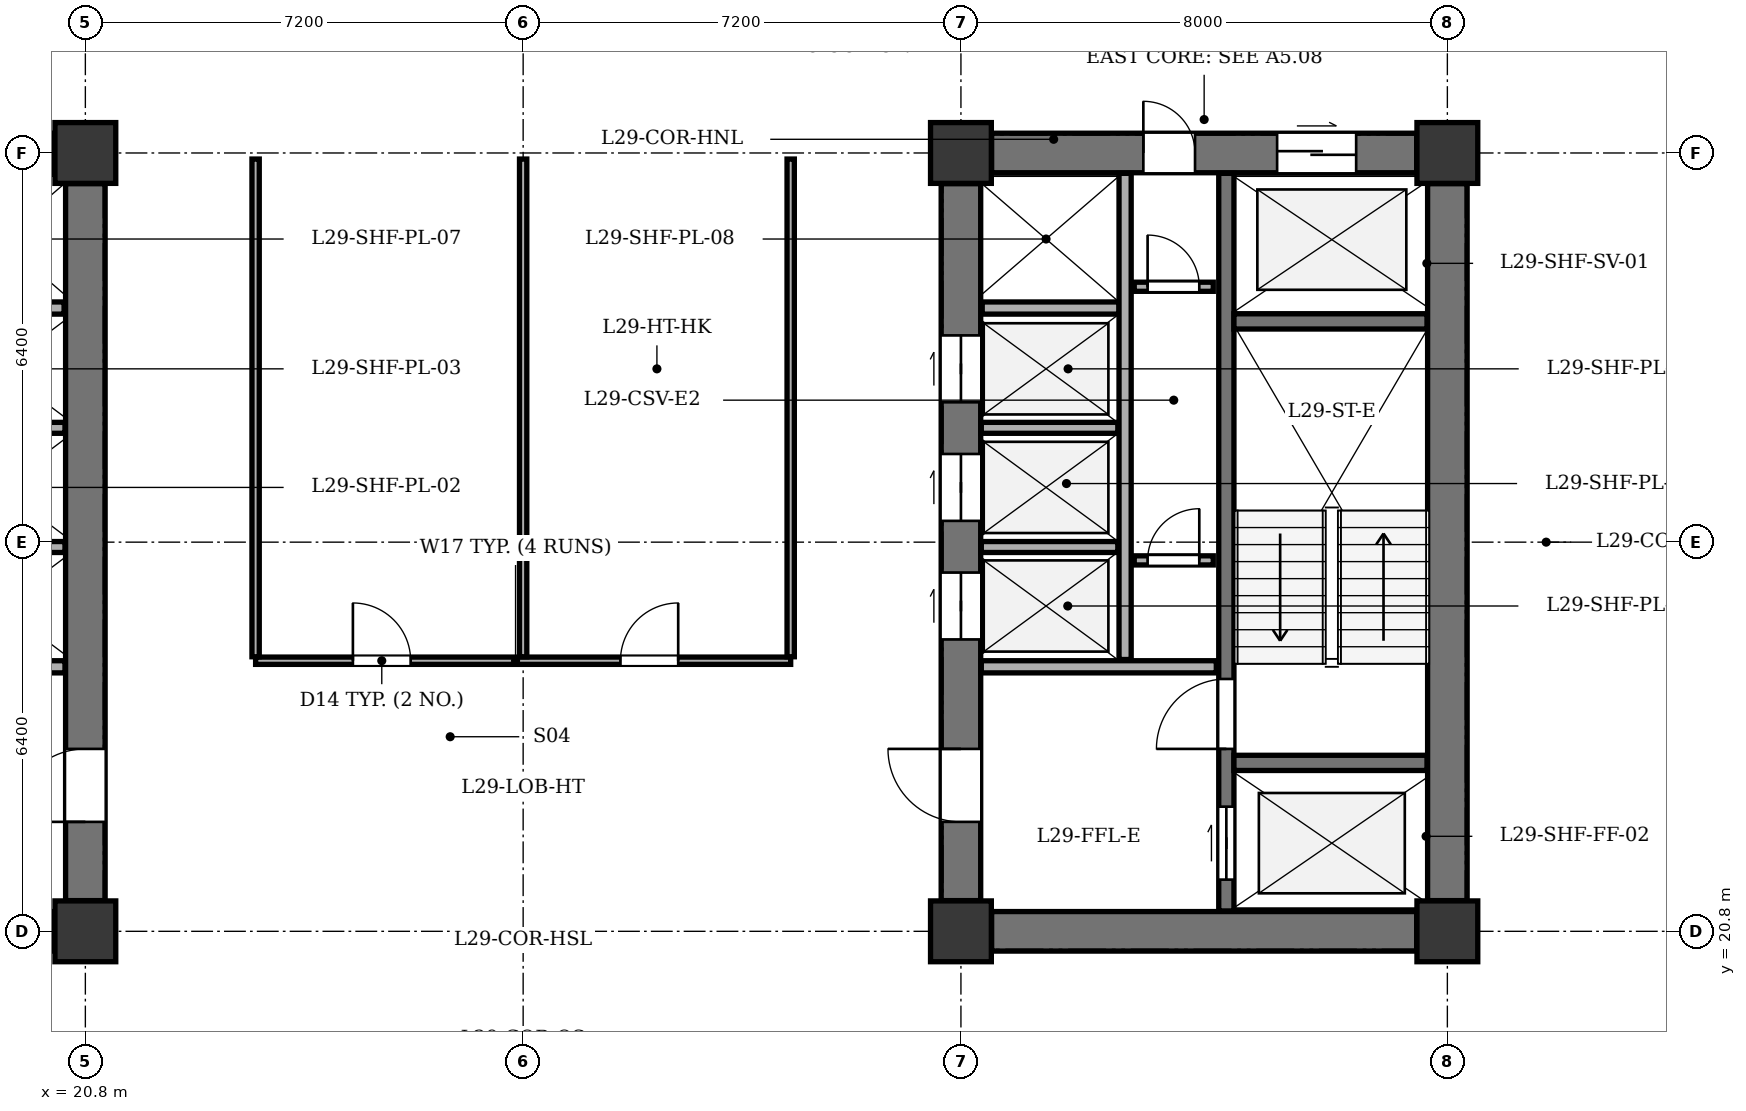
"""IFC4 building model, lengths in metres.
Left out: names, types, materials, properties, quantities, classifications, styles, units other than length and angle.
Written with IfcOpenShell. Run it as: python <this file> out.ifc"""

import sys

from ifc_helpers import new_model, si_unit, direction, frame, frame_2d, origin, origin_2d, place, context, subcontext, project, spatial, rectangle, extrude, element, fill, save


model = new_model("IFC4")
c1 = context("Model", 3, precision=1e-05, world=origin(), true_north=direction((0.0, 1.0)))
c2 = subcontext(c1, "Body", "Model", "MODEL_VIEW")
j1 = project(units=[si_unit("LENGTHUNIT", "METRE"), si_unit("PLANEANGLEUNIT", "RADIAN")], contexts=[c1])
p1 = place(None, origin())
s1 = spatial("IfcSite", under=j1, at=p1, CompositionType="ELEMENT")
p2 = place(p1, origin())
s2 = spatial("IfcBuilding", under=s1, at=p2, CompositionType="ELEMENT")
p3 = place(p2, frame((0.0, 0.0, 120.3)))
s3 = spatial("IfcBuildingStorey", under=s2, at=p3, CompositionType="ELEMENT", Elevation=120.3)
for number, where, z_axis, x_axis in (
    (1, (20.8, 20.8, 0.0), (0.0, 0.0, 1.0), (1.0, 0.0, 0.0)),
    (2, (20.8, 33.6, 0.0), (0.0, 0.0, 1.0), (1.0, 0.0, 0.0)),
    (3, (35.2, 20.8, 0.0), (0.0, 0.0, 1.0), (1.0, 0.0, 0.0)),
    (4, (43.2, 20.8, 0.0), (0.0, 0.0, 1.0), (1.0, 0.0, 0.0)),
    (5, (35.2, 33.6, 0.0), (0.0, 0.0, 1.0), (1.0, 0.0, 0.0)),
    (6, (43.2, 33.6, 0.0), (0.0, 0.0, 1.0), (1.0, 0.0, 0.0)),
):
    element("IfcColumn", number, at=place(p3, frame(where, z_axis=z_axis, x_axis=x_axis)), inside=s3, PredefinedType="COLUMN", context=c2, shape_type="SweptSolid", body=[
        extrude(rectangle(XDim=1.0, YDim=1.0, at=origin_2d()), origin(), (0.0, 0.0, 1.0), 3.5),
    ])
p4 = place(p3, frame((13.305, 20.8, 0.0), z_axis=(0.0, 0.0, 1.0), x_axis=(1.0, 0.0, 0.0)))
e7 = element("IfcWall", 7, at=p4, inside=s3, PredefinedType="SHEAR", context=c2, shape_type="SweptSolid", body=[
    extrude(rectangle(XDim=6.99, YDim=0.65, at=frame_2d((3.495, 0.0))), origin(), (0.0, 0.0, 1.0), 3.2),
])
p5 = place(p3, frame((13.305, 33.6, 0.0), z_axis=(0.0, 0.0, 1.0), x_axis=(1.0, 0.0, 0.0)))
e8 = element("IfcWall", 8, at=p5, inside=s3, PredefinedType="SHEAR", context=c2, shape_type="SweptSolid", body=[
    extrude(rectangle(XDim=6.99, YDim=0.65, at=frame_2d((3.495, 0.0))), origin(), (0.0, 0.0, 1.0), 3.2),
])
p6 = place(p5, frame((1.095, 0.0, 0.0)))
e9 = element("IfcOpeningElement", 9, at=p6, cuts=e8, PredefinedType="OPENING", context=c2, shape_type="SweptSolid", body=[
    extrude(rectangle(XDim=0.85, YDim=2.02, at=frame_2d((0.425, 1.01))), frame((0.0, 0.335, 0.0), z_axis=(0.0, -1.0, 0.0), x_axis=(1.0, 0.0, 0.0)), (0.0, 0.0, 1.0), 0.67),
])
p7 = place(p3, frame((20.8, 21.305, 0.0), z_axis=(0.0, 0.0, 1.0), x_axis=(0.0, 1.0, 0.0)))
e10 = element("IfcWall", 10, at=p7, inside=s3, PredefinedType="SHEAR", context=c2, shape_type="SweptSolid", body=[
    extrude(rectangle(XDim=11.79, YDim=0.65, at=frame_2d((5.895, 0.0))), origin(), (0.0, 0.0, 1.0), 3.2),
])
p8 = place(p7, frame((1.295, 0.0, 0.0)))
e11 = element("IfcOpeningElement", 11, at=p8, cuts=e10, PredefinedType="OPENING", context=c2, shape_type="SweptSolid", body=[
    extrude(rectangle(XDim=1.2, YDim=2.15, at=frame_2d((0.6, 1.075))), frame((0.0, 0.335, 0.0), z_axis=(0.0, -1.0, 0.0), x_axis=(1.0, 0.0, 0.0)), (0.0, 0.0, 1.0), 0.67),
])
p9 = place(p3, frame((16.6, 25.15, 0.0), z_axis=(0.0, 0.0, 1.0), x_axis=(1.0, 0.0, 0.0)))
e12 = element("IfcWall", 12, at=p9, inside=s3, PredefinedType="SOLIDWALL", context=c2, shape_type="SweptSolid", body=[
    extrude(rectangle(XDim=3.865, YDim=0.2, at=frame_2d((1.933, 0.0))), origin(), (0.0, 0.0, 1.0), 3.2),
])
p10 = place(p9, frame((0.3, 0.0, 0.0)))
e13 = element("IfcOpeningElement", 13, at=p10, cuts=e12, PredefinedType="OPENING", context=c2, shape_type="SweptSolid", body=[
    extrude(rectangle(XDim=0.85, YDim=2.02, at=frame_2d((0.425, 1.01))), frame((0.0, 0.11, 0.0), z_axis=(0.0, -1.0, 0.0), x_axis=(1.0, 0.0, 0.0)), (0.0, 0.0, 1.0), 0.22),
])
p11 = place(p3, frame((16.6, 31.05, 0.0), z_axis=(0.0, 0.0, 1.0), x_axis=(1.0, 0.0, 0.0)))
e14 = element("IfcWall", 14, at=p11, inside=s3, PredefinedType="SOLIDWALL", context=c2, shape_type="SweptSolid", body=[
    extrude(rectangle(XDim=3.85, YDim=0.2, at=frame_2d((1.925, 0.0))), origin(), (0.0, 0.0, 1.0), 3.2),
])
for number, where, z_axis, x_axis in (
    (15, (18.22, 27.12, 0.0), (0.0, 0.0, 1.0), (1.0, 0.0, 0.0)),
    (16, (18.22, 29.08, 0.0), (0.0, 0.0, 1.0), (1.0, 0.0, 0.0)),
):
    element("IfcWall", number, at=place(p3, frame(where, z_axis=z_axis, x_axis=x_axis)), inside=s3, PredefinedType="PARTITIONING", context=c2, shape_type="SweptSolid", body=[
        extrude(rectangle(XDim=2.245, YDim=0.18, at=frame_2d((1.123, 0.0))), origin(), (0.0, 0.0, 1.0), 3.2),
    ])
p12 = place(p3, frame((43.2, 21.305, 0.0), z_axis=(0.0, 0.0, 1.0), x_axis=(0.0, 1.0, 0.0)))
e17 = element("IfcWall", 17, at=p12, inside=s3, PredefinedType="SHEAR", context=c2, shape_type="SweptSolid", body=[
    extrude(rectangle(XDim=11.79, YDim=0.65, at=frame_2d((5.895, 0.0))), origin(), (0.0, 0.0, 1.0), 3.2),
])
p13 = place(p3, frame((35.705, 20.8, 0.0), z_axis=(0.0, 0.0, 1.0), x_axis=(1.0, 0.0, 0.0)))
e18 = element("IfcWall", 18, at=p13, inside=s3, PredefinedType="SHEAR", context=c2, shape_type="SweptSolid", body=[
    extrude(rectangle(XDim=6.99, YDim=0.65, at=frame_2d((3.495, 0.0))), origin(), (0.0, 0.0, 1.0), 3.2),
])
p14 = place(p3, frame((35.705, 33.6, 0.0), z_axis=(0.0, 0.0, 1.0), x_axis=(1.0, 0.0, 0.0)))
e19 = element("IfcWall", 19, at=p14, inside=s3, PredefinedType="SHEAR", context=c2, shape_type="SweptSolid", body=[
    extrude(rectangle(XDim=6.99, YDim=0.65, at=frame_2d((3.495, 0.0))), origin(), (0.0, 0.0, 1.0), 3.2),
])
p15 = place(p14, frame((4.695, 0.0, 0.0)))
e20 = element("IfcOpeningElement", 20, at=p15, cuts=e19, PredefinedType="OPENING", context=c2, shape_type="SweptSolid", body=[
    extrude(rectangle(XDim=1.3, YDim=2.15, at=frame_2d((0.65, 1.075))), frame((0.0, 0.335, 0.0), z_axis=(0.0, -1.0, 0.0), x_axis=(1.0, 0.0, 0.0)), (0.0, 0.0, 1.0), 0.67),
])
p16 = place(p14, frame((2.495, 0.0, 0.0)))
e21 = element("IfcOpeningElement", 21, at=p16, cuts=e19, PredefinedType="OPENING", context=c2, shape_type="SweptSolid", body=[
    extrude(rectangle(XDim=0.85, YDim=2.02, at=frame_2d((0.425, 1.01))), frame((0.0, 0.335, 0.0), z_axis=(0.0, -1.0, 0.0), x_axis=(1.0, 0.0, 0.0)), (0.0, 0.0, 1.0), 0.67),
])
p17 = place(p3, frame((35.2, 21.305, 0.0), z_axis=(0.0, 0.0, 1.0), x_axis=(0.0, 1.0, 0.0)))
e22 = element("IfcWall", 22, at=p17, inside=s3, PredefinedType="SHEAR", context=c2, shape_type="SweptSolid", body=[
    extrude(rectangle(XDim=11.79, YDim=0.65, at=frame_2d((5.895, 0.0))), origin(), (0.0, 0.0, 1.0), 3.2),
])
p18 = place(p17, frame((1.295, 0.0, 0.0)))
e23 = element("IfcOpeningElement", 23, at=p18, cuts=e22, PredefinedType="OPENING", context=c2, shape_type="SweptSolid", body=[
    extrude(rectangle(XDim=1.2, YDim=2.15, at=frame_2d((0.6, 1.075))), frame((0.0, 0.335, 0.0), z_axis=(0.0, -1.0, 0.0), x_axis=(1.0, 0.0, 0.0)), (0.0, 0.0, 1.0), 0.67),
])
p19 = place(p17, frame((4.295, 0.0, 0.0)))
e24 = element("IfcOpeningElement", 24, at=p19, cuts=e22, PredefinedType="OPENING", context=c2, shape_type="SweptSolid", body=[
    extrude(rectangle(XDim=1.1, YDim=2.1, at=frame_2d((0.55, 1.05))), frame((0.0, 0.335, 0.0), z_axis=(0.0, -1.0, 0.0), x_axis=(1.0, 0.0, 0.0)), (0.0, 0.0, 1.0), 0.67),
])
p20 = place(p17, frame((6.245, 0.0, 0.0)))
e25 = element("IfcOpeningElement", 25, at=p20, cuts=e22, PredefinedType="OPENING", context=c2, shape_type="SweptSolid", body=[
    extrude(rectangle(XDim=1.1, YDim=2.1, at=frame_2d((0.55, 1.05))), frame((0.0, 0.335, 0.0), z_axis=(0.0, -1.0, 0.0), x_axis=(1.0, 0.0, 0.0)), (0.0, 0.0, 1.0), 0.67),
])
p21 = place(p17, frame((8.195, 0.0, 0.0)))
e26 = element("IfcOpeningElement", 26, at=p21, cuts=e22, PredefinedType="OPENING", context=c2, shape_type="SweptSolid", body=[
    extrude(rectangle(XDim=1.1, YDim=2.1, at=frame_2d((0.55, 1.05))), frame((0.0, 0.335, 0.0), z_axis=(0.0, -1.0, 0.0), x_axis=(1.0, 0.0, 0.0)), (0.0, 0.0, 1.0), 0.67),
])
p22 = place(p3, frame((39.565, 21.135, 0.0), z_axis=(0.0, 0.0, 1.0), x_axis=(0.0, 1.0, 0.0)))
e27 = element("IfcWall", 27, at=p22, inside=s3, PredefinedType="SHEAR", context=c2, shape_type="SweptSolid", body=[
    extrude(rectangle(XDim=12.13, YDim=0.25, at=frame_2d((6.065, 0.0))), origin(), (0.0, 0.0, 1.0), 3.2),
])
p23 = place(p22, frame((0.515, 0.0, 0.0)))
e28 = element("IfcOpeningElement", 28, at=p23, cuts=e27, PredefinedType="OPENING", context=c2, shape_type="SweptSolid", body=[
    extrude(rectangle(XDim=1.2, YDim=2.15, at=frame_2d((0.6, 1.075))), frame((0.0, 0.135, 0.0), z_axis=(0.0, -1.0, 0.0), x_axis=(1.0, 0.0, 0.0)), (0.0, 0.0, 1.0), 0.27),
])
p24 = place(p22, frame((2.665, 0.0, 0.0)))
e29 = element("IfcOpeningElement", 29, at=p24, cuts=e27, PredefinedType="OPENING", context=c2, shape_type="SweptSolid", body=[
    extrude(rectangle(XDim=1.15, YDim=2.15, at=frame_2d((0.575, 1.075))), frame((0.0, 0.135, 0.0), z_axis=(0.0, -1.0, 0.0), x_axis=(1.0, 0.0, 0.0)), (0.0, 0.0, 1.0), 0.27),
])
for number, where, z_axis, x_axis in (
    (30, (39.69, 23.57, 0.0), (0.0, 0.0, 1.0), (1.0, 0.0, 0.0)),
    (31, (39.69, 30.83, 0.0), (0.0, 0.0, 1.0), (1.0, 0.0, 0.0)),
):
    element("IfcWall", number, at=place(p3, frame(where, z_axis=z_axis, x_axis=x_axis)), inside=s3, PredefinedType="SHEAR", context=c2, shape_type="SweptSolid", body=[
        extrude(rectangle(XDim=3.175, YDim=0.25, at=frame_2d((1.587, 0.0))), origin(), (0.0, 0.0, 1.0), 3.2),
    ])
p25 = place(p3, frame((35.535, 25.15, 0.0), z_axis=(0.0, 0.0, 1.0), x_axis=(1.0, 0.0, 0.0)))
e32 = element("IfcWall", 32, at=p25, inside=s3, PredefinedType="SOLIDWALL", context=c2, shape_type="SweptSolid", body=[
    extrude(rectangle(XDim=3.865, YDim=0.2, at=frame_2d((1.933, 0.0))), origin(), (0.0, 0.0, 1.0), 3.2),
])
p26 = place(p3, frame((35.55, 31.05, 0.0), z_axis=(0.0, 0.0, 1.0), x_axis=(1.0, 0.0, 0.0)))
e33 = element("IfcWall", 33, at=p26, inside=s3, PredefinedType="SOLIDWALL", context=c2, shape_type="SweptSolid", body=[
    extrude(rectangle(XDim=2.25, YDim=0.2, at=frame_2d((1.125, 0.0))), origin(), (0.0, 0.0, 1.0), 3.2),
])
p27 = place(p3, frame((37.9, 25.27, 0.0), z_axis=(0.0, 0.0, 1.0), x_axis=(0.0, 1.0, 0.0)))
e34 = element("IfcWall", 34, at=p27, inside=s3, PredefinedType="SOLIDWALL", context=c2, shape_type="SweptSolid", body=[
    extrude(rectangle(XDim=7.995, YDim=0.2, at=frame_2d((3.998, 0.0))), origin(), (0.0, 0.0, 1.0), 3.2),
])
for number, where, z_axis, x_axis in (
    (35, (35.535, 27.12, 0.0), (0.0, 0.0, 1.0), (1.0, 0.0, 0.0)),
    (36, (35.535, 29.08, 0.0), (0.0, 0.0, 1.0), (1.0, 0.0, 0.0)),
):
    element("IfcWall", number, at=place(p3, frame(where, z_axis=z_axis, x_axis=x_axis)), inside=s3, PredefinedType="PARTITIONING", context=c2, shape_type="SweptSolid", body=[
        extrude(rectangle(XDim=2.245, YDim=0.18, at=frame_2d((1.123, 0.0))), origin(), (0.0, 0.0, 1.0), 3.2),
    ])
p28 = place(p3, frame((38.05, 26.9, 0.0), z_axis=(0.0, 0.0, 1.0), x_axis=(1.0, 0.0, 0.0)))
e37 = element("IfcWall", 37, at=p28, inside=s3, PredefinedType="PARTITIONING", context=c2, shape_type="SweptSolid", body=[
    extrude(rectangle(XDim=1.3, YDim=0.15, at=frame_2d((0.65, 0.0))), origin(), (0.0, 0.0, 1.0), 3.2),
])
p29 = place(p28, frame((0.22, 0.0, 0.0)))
e38 = element("IfcOpeningElement", 38, at=p29, cuts=e37, PredefinedType="OPENING", context=c2, shape_type="SweptSolid", body=[
    extrude(rectangle(XDim=0.85, YDim=2.02, at=frame_2d((0.425, 1.01))), frame((0.0, 0.085, 0.0), z_axis=(0.0, -1.0, 0.0), x_axis=(1.0, 0.0, 0.0)), (0.0, 0.0, 1.0), 0.17),
])
p30 = place(p3, frame((38.05, 31.4, 0.0), z_axis=(0.0, 0.0, 1.0), x_axis=(1.0, 0.0, 0.0)))
e39 = element("IfcWall", 39, at=p30, inside=s3, PredefinedType="PARTITIONING", context=c2, shape_type="SweptSolid", body=[
    extrude(rectangle(XDim=1.3, YDim=0.15, at=frame_2d((0.65, 0.0))), origin(), (0.0, 0.0, 1.0), 3.2),
])
p31 = place(p30, frame((0.22, 0.0, 0.0)))
e40 = element("IfcOpeningElement", 40, at=p31, cuts=e39, PredefinedType="OPENING", context=c2, shape_type="SweptSolid", body=[
    extrude(rectangle(XDim=0.85, YDim=2.02, at=frame_2d((0.425, 1.01))), frame((0.0, 0.085, 0.0), z_axis=(0.0, -1.0, 0.0), x_axis=(1.0, 0.0, 0.0)), (0.0, 0.0, 1.0), 0.17),
])
p32 = place(p3, frame((23.6, 25.25, 0.0), z_axis=(0.0, 0.0, 1.0), x_axis=(1.0, 0.0, 0.0)))
e41 = element("IfcWall", 41, at=p32, inside=s3, PredefinedType="PARTITIONING", context=c2, shape_type="SweptSolid", body=[
    extrude(rectangle(XDim=8.8, YDim=0.12, at=frame_2d((4.4, 0.0))), origin(), (0.0, 0.0, 1.0), 3.2),
])
p33 = place(p32, frame((1.6, 0.0, 0.0)))
e42 = element("IfcOpeningElement", 42, at=p33, cuts=e41, PredefinedType="OPENING", context=c2, shape_type="SweptSolid", body=[
    extrude(rectangle(XDim=0.95, YDim=2.1, at=frame_2d((0.475, 1.05))), frame((0.0, 0.07, 0.0), z_axis=(0.0, -1.0, 0.0), x_axis=(1.0, 0.0, 0.0)), (0.0, 0.0, 1.0), 0.14),
])
p34 = place(p32, frame((6.0, 0.0, 0.0)))
e43 = element("IfcOpeningElement", 43, at=p34, cuts=e41, PredefinedType="OPENING", context=c2, shape_type="SweptSolid", body=[
    extrude(rectangle(XDim=0.95, YDim=2.1, at=frame_2d((0.475, 1.05))), frame((0.0, 0.07, 0.0), z_axis=(0.0, -1.0, 0.0), x_axis=(1.0, 0.0, 0.0)), (0.0, 0.0, 1.0), 0.14),
])
for number, where, z_axis, x_axis in (
    (44, (23.6, 25.315, 0.0), (0.0, 0.0, 1.0), (0.0, 1.0, 0.0)),
    (45, (32.4, 25.315, 0.0), (0.0, 0.0, 1.0), (0.0, 1.0, 0.0)),
):
    element("IfcWall", number, at=place(p3, frame(where, z_axis=z_axis, x_axis=x_axis)), inside=s3, PredefinedType="PARTITIONING", context=c2, shape_type="SweptSolid", body=[
        extrude(rectangle(XDim=8.185, YDim=0.12, at=frame_2d((4.093, 0.0))), origin(), (0.0, 0.0, 1.0), 3.2),
    ])
p35 = place(p3, frame((28.0, 25.315, 0.0), z_axis=(0.0, 0.0, 1.0), x_axis=(0.0, 1.0, 0.0)))
e46 = element("IfcWall", 46, at=p35, inside=s3, PredefinedType="PARTITIONING", context=c2, shape_type="SweptSolid", body=[
    extrude(rectangle(XDim=8.185, YDim=0.12, at=frame_2d((4.093, 0.0))), origin(), (0.0, 0.0, 1.0), 2.535),
])
p36 = place(p8, origin())
e47 = element("IfcDoor", 47, at=p36, inside=s3, OperationType="SINGLE_SWING_LEFT", PredefinedType="DOOR", context=c2, shape_type="SweptSolid", body=[
    extrude(rectangle(XDim=1.2, YDim=2.15, at=frame_2d((0.6, 1.075))), frame((0.0, 0.025, 0.0), z_axis=(0.0, -1.0, 0.0), x_axis=(1.0, 0.0, 0.0)), (0.0, 0.0, 1.0), 0.05),
])
fill(e11, e47)
p37 = place(p15, origin())
e48 = element("IfcDoor", 48, at=p37, inside=s3, OperationType="DOUBLE_DOOR_SLIDING", PredefinedType="DOOR", context=c2, shape_type="SweptSolid", body=[
    extrude(rectangle(XDim=1.3, YDim=2.15, at=frame_2d((0.65, 1.075))), frame((0.0, 0.025, 0.0), z_axis=(0.0, -1.0, 0.0), x_axis=(1.0, 0.0, 0.0)), (0.0, 0.0, 1.0), 0.05),
])
fill(e20, e48)
p38 = place(p16, origin())
e49 = element("IfcDoor", 49, at=p38, inside=s3, OperationType="SINGLE_SWING_LEFT", PredefinedType="DOOR", context=c2, shape_type="SweptSolid", body=[
    extrude(rectangle(XDim=0.85, YDim=2.02, at=frame_2d((0.425, 1.01))), frame((0.0, 0.025, 0.0), z_axis=(0.0, -1.0, 0.0), x_axis=(1.0, 0.0, 0.0)), (0.0, 0.0, 1.0), 0.05),
])
fill(e21, e49)
p39 = place(p18, origin())
e50 = element("IfcDoor", 50, at=p39, inside=s3, OperationType="SINGLE_SWING_RIGHT", PredefinedType="DOOR", context=c2, shape_type="SweptSolid", body=[
    extrude(rectangle(XDim=1.2, YDim=2.15, at=frame_2d((0.6, 1.075))), frame((0.0, 0.025, 0.0), z_axis=(0.0, -1.0, 0.0), x_axis=(1.0, 0.0, 0.0)), (0.0, 0.0, 1.0), 0.05),
])
fill(e23, e50)
p40 = place(p19, origin())
e51 = element("IfcDoor", 51, at=p40, inside=s3, OperationType="DOUBLE_DOOR_SLIDING", PredefinedType="DOOR", context=c2, shape_type="SweptSolid", body=[
    extrude(rectangle(XDim=1.1, YDim=2.1, at=frame_2d((0.55, 1.05))), frame((0.0, 0.025, 0.0), z_axis=(0.0, -1.0, 0.0), x_axis=(1.0, 0.0, 0.0)), (0.0, 0.0, 1.0), 0.05),
])
fill(e24, e51)
p41 = place(p20, origin())
e52 = element("IfcDoor", 52, at=p41, inside=s3, OperationType="DOUBLE_DOOR_SLIDING", PredefinedType="DOOR", context=c2, shape_type="SweptSolid", body=[
    extrude(rectangle(XDim=1.1, YDim=2.1, at=frame_2d((0.55, 1.05))), frame((0.0, 0.025, 0.0), z_axis=(0.0, -1.0, 0.0), x_axis=(1.0, 0.0, 0.0)), (0.0, 0.0, 1.0), 0.05),
])
fill(e25, e52)
p42 = place(p21, origin())
e53 = element("IfcDoor", 53, at=p42, inside=s3, OperationType="DOUBLE_DOOR_SLIDING", PredefinedType="DOOR", context=c2, shape_type="SweptSolid", body=[
    extrude(rectangle(XDim=1.1, YDim=2.1, at=frame_2d((0.55, 1.05))), frame((0.0, 0.025, 0.0), z_axis=(0.0, -1.0, 0.0), x_axis=(1.0, 0.0, 0.0)), (0.0, 0.0, 1.0), 0.05),
])
fill(e26, e53)
p43 = place(p23, origin())
e54 = element("IfcDoor", 54, at=p43, inside=s3, OperationType="DOUBLE_DOOR_SLIDING", PredefinedType="DOOR", context=c2, shape_type="SweptSolid", body=[
    extrude(rectangle(XDim=1.2, YDim=2.15, at=frame_2d((0.6, 1.075))), frame((0.0, 0.025, 0.0), z_axis=(0.0, -1.0, 0.0), x_axis=(1.0, 0.0, 0.0)), (0.0, 0.0, 1.0), 0.05),
])
fill(e28, e54)
p44 = place(p24, origin())
e55 = element("IfcDoor", 55, at=p44, inside=s3, OperationType="SINGLE_SWING_LEFT", PredefinedType="DOOR", context=c2, shape_type="SweptSolid", body=[
    extrude(rectangle(XDim=1.15, YDim=2.15, at=frame_2d((0.575, 1.075))), frame((0.0, 0.025, 0.0), z_axis=(0.0, -1.0, 0.0), x_axis=(1.0, 0.0, 0.0)), (0.0, 0.0, 1.0), 0.05),
])
fill(e29, e55)
p45 = place(p29, origin())
e56 = element("IfcDoor", 56, at=p45, inside=s3, OperationType="SINGLE_SWING_RIGHT", PredefinedType="DOOR", context=c2, shape_type="SweptSolid", body=[
    extrude(rectangle(XDim=0.85, YDim=2.02, at=frame_2d((0.425, 1.01))), frame((0.0, 0.025, 0.0), z_axis=(0.0, -1.0, 0.0), x_axis=(1.0, 0.0, 0.0)), (0.0, 0.0, 1.0), 0.05),
])
fill(e38, e56)
p46 = place(p31, origin())
e57 = element("IfcDoor", 57, at=p46, inside=s3, OperationType="SINGLE_SWING_LEFT", PredefinedType="DOOR", context=c2, shape_type="SweptSolid", body=[
    extrude(rectangle(XDim=0.85, YDim=2.02, at=frame_2d((0.425, 1.01))), frame((0.0, 0.025, 0.0), z_axis=(0.0, -1.0, 0.0), x_axis=(1.0, 0.0, 0.0)), (0.0, 0.0, 1.0), 0.05),
])
fill(e40, e57)
p47 = place(p33, origin())
e58 = element("IfcDoor", 58, at=p47, inside=s3, OperationType="SINGLE_SWING_LEFT", PredefinedType="DOOR", context=c2, shape_type="SweptSolid", body=[
    extrude(rectangle(XDim=0.95, YDim=2.1, at=frame_2d((0.475, 1.05))), frame((0.0, 0.025, 0.0), z_axis=(0.0, -1.0, 0.0), x_axis=(1.0, 0.0, 0.0)), (0.0, 0.0, 1.0), 0.05),
])
fill(e42, e58)
p48 = place(p34, origin())
e59 = element("IfcDoor", 59, at=p48, inside=s3, OperationType="SINGLE_SWING_RIGHT", PredefinedType="DOOR", context=c2, shape_type="SweptSolid", body=[
    extrude(rectangle(XDim=0.95, YDim=2.1, at=frame_2d((0.475, 1.05))), frame((0.0, 0.025, 0.0), z_axis=(0.0, -1.0, 0.0), x_axis=(1.0, 0.0, 0.0)), (0.0, 0.0, 1.0), 0.05),
])
fill(e43, e59)
save(model, sys.argv[1])
